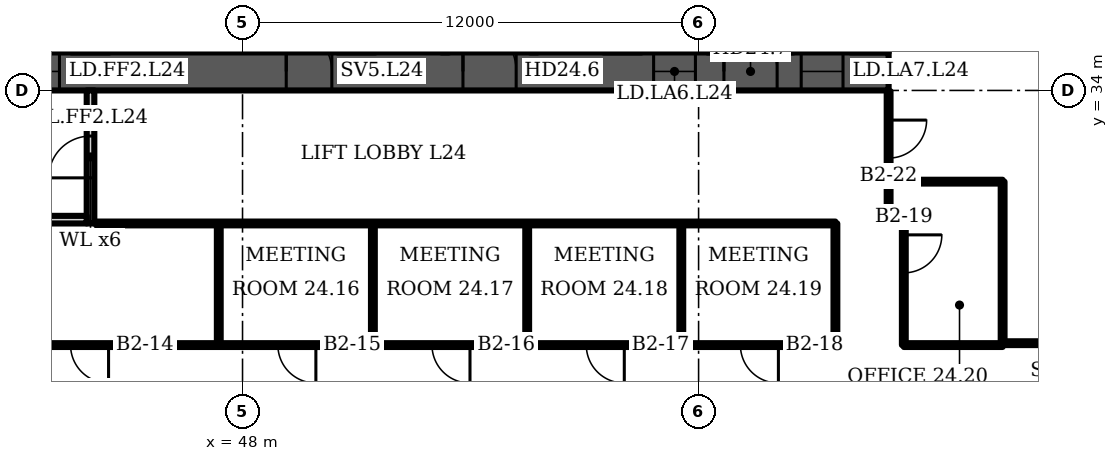
"""IFC4 building model, lengths in metres.
Left out: names, types, materials, properties, quantities, classifications, styles, units other than length and angle.
Written with IfcOpenShell. Run it as: python <this file> out.ifc"""

import sys

from ifc_helpers import new_model, si_unit, direction, frame, frame_2d, origin, place, context, subcontext, project, spatial, rectangle, extrude, element, fill, save


model = new_model("IFC4")
c1 = context("Model", 3, precision=1e-05, world=origin(), true_north=direction((0.0, 1.0)))
c2 = subcontext(c1, "Body", "Model", "MODEL_VIEW")
j1 = project(units=[si_unit("LENGTHUNIT", "METRE"), si_unit("PLANEANGLEUNIT", "RADIAN")], contexts=[c1])
p1 = place(None, origin())
s1 = spatial("IfcSite", under=j1, at=p1, CompositionType="ELEMENT")
p2 = place(p1, origin())
s2 = spatial("IfcBuilding", under=s1, at=p2, CompositionType="ELEMENT")
p3 = place(p2, frame((0.0, 0.0, 107.5)))
s3 = spatial("IfcBuildingStorey", under=s2, at=p3, CompositionType="ELEMENT", Elevation=107.5)
p4 = place(p3, frame((16.0, 34.5, 0.0), z_axis=(0.0, 0.0, 1.0), x_axis=(1.0, 0.0, 0.0)))
e1 = element("IfcWall", 1, at=p4, inside=s3, PredefinedType="SHEAR", context=c2, shape_type="SweptSolid", body=[
    extrude(rectangle(XDim=49.0, YDim=1.0, at=frame_2d((24.5, 0.0))), origin(), (0.0, 0.0, 1.0), 3.6),
])
p5 = place(p4, frame((1.2, 0.0, 0.0)))
e2 = element("IfcOpeningElement", 2, at=p5, cuts=e1, PredefinedType="OPENING", context=c2, shape_type="SweptSolid", body=[
    extrude(rectangle(XDim=1.1, YDim=2.1, at=frame_2d((0.55, 1.05))), frame((0.0, 0.51, 0.0), z_axis=(0.0, -1.0, 0.0), x_axis=(1.0, 0.0, 0.0)), (0.0, 0.0, 1.0), 1.02),
])
p6 = place(p4, frame((5.083, 0.0, 0.0)))
e3 = element("IfcOpeningElement", 3, at=p6, cuts=e1, PredefinedType="OPENING", context=c2, shape_type="SweptSolid", body=[
    extrude(rectangle(XDim=1.1, YDim=2.1, at=frame_2d((0.55, 1.05))), frame((0.0, 0.51, 0.0), z_axis=(0.0, -1.0, 0.0), x_axis=(1.0, 0.0, 0.0)), (0.0, 0.0, 1.0), 1.02),
])
p7 = place(p4, frame((2.933, 0.0, 0.0)))
e4 = element("IfcOpeningElement", 4, at=p7, cuts=e1, PredefinedType="OPENING", context=c2, shape_type="SweptSolid", body=[
    extrude(rectangle(XDim=1.4, YDim=2.1, at=frame_2d((0.7, 1.05))), frame((0.0, 0.51, 0.0), z_axis=(0.0, -1.0, 0.0), x_axis=(1.0, 0.0, 0.0)), (0.0, 0.0, 1.0), 1.02),
])
p8 = place(p4, frame((7.65, 0.0, 0.0)))
e5 = element("IfcOpeningElement", 5, at=p8, cuts=e1, PredefinedType="OPENING", context=c2, shape_type="SweptSolid", body=[
    extrude(rectangle(XDim=1.2, YDim=2.1, at=frame_2d((0.6, 1.05))), frame((0.0, 0.51, 0.0), z_axis=(0.0, -1.0, 0.0), x_axis=(1.0, 0.0, 0.0)), (0.0, 0.0, 1.0), 1.02),
])
p9 = place(p4, frame((14.817, 0.0, 0.0)))
e6 = element("IfcOpeningElement", 6, at=p9, cuts=e1, PredefinedType="OPENING", context=c2, shape_type="SweptSolid", body=[
    extrude(rectangle(XDim=1.1, YDim=2.1, at=frame_2d((0.55, 1.05))), frame((0.0, 0.51, 0.0), z_axis=(0.0, -1.0, 0.0), x_axis=(1.0, 0.0, 0.0)), (0.0, 0.0, 1.0), 1.02),
])
p10 = place(p4, frame((19.083, 0.0, 0.0)))
e7 = element("IfcOpeningElement", 7, at=p10, cuts=e1, PredefinedType="OPENING", context=c2, shape_type="SweptSolid", body=[
    extrude(rectangle(XDim=1.1, YDim=2.1, at=frame_2d((0.55, 1.05))), frame((0.0, 0.51, 0.0), z_axis=(0.0, -1.0, 0.0), x_axis=(1.0, 0.0, 0.0)), (0.0, 0.0, 1.0), 1.02),
])
p11 = place(p4, frame((16.8, 0.0, 0.0)))
e8 = element("IfcOpeningElement", 8, at=p11, cuts=e1, PredefinedType="OPENING", context=c2, shape_type="SweptSolid", body=[
    extrude(rectangle(XDim=1.4, YDim=2.1, at=frame_2d((0.7, 1.05))), frame((0.0, 0.51, 0.0), z_axis=(0.0, -1.0, 0.0), x_axis=(1.0, 0.0, 0.0)), (0.0, 0.0, 1.0), 1.02),
])
p12 = place(p4, frame((21.817, 0.0, 0.0)))
e9 = element("IfcOpeningElement", 9, at=p12, cuts=e1, PredefinedType="OPENING", context=c2, shape_type="SweptSolid", body=[
    extrude(rectangle(XDim=1.1, YDim=2.1, at=frame_2d((0.55, 1.05))), frame((0.0, 0.51, 0.0), z_axis=(0.0, -1.0, 0.0), x_axis=(1.0, 0.0, 0.0)), (0.0, 0.0, 1.0), 1.02),
])
p13 = place(p4, frame((26.083, 0.0, 0.0)))
e10 = element("IfcOpeningElement", 10, at=p13, cuts=e1, PredefinedType="OPENING", context=c2, shape_type="SweptSolid", body=[
    extrude(rectangle(XDim=1.1, YDim=2.1, at=frame_2d((0.55, 1.05))), frame((0.0, 0.51, 0.0), z_axis=(0.0, -1.0, 0.0), x_axis=(1.0, 0.0, 0.0)), (0.0, 0.0, 1.0), 1.02),
])
p14 = place(p4, frame((33.15, 0.0, 0.0)))
e11 = element("IfcOpeningElement", 11, at=p14, cuts=e1, PredefinedType="OPENING", context=c2, shape_type="SweptSolid", body=[
    extrude(rectangle(XDim=1.2, YDim=2.1, at=frame_2d((0.6, 1.05))), frame((0.0, 0.51, 0.0), z_axis=(0.0, -1.0, 0.0), x_axis=(1.0, 0.0, 0.0)), (0.0, 0.0, 1.0), 1.02),
])
p15 = place(p4, frame((37.8, 0.0, 0.0)))
e12 = element("IfcOpeningElement", 12, at=p15, cuts=e1, PredefinedType="OPENING", context=c2, shape_type="SweptSolid", body=[
    extrude(rectangle(XDim=1.4, YDim=2.1, at=frame_2d((0.7, 1.05))), frame((0.0, 0.51, 0.0), z_axis=(0.0, -1.0, 0.0), x_axis=(1.0, 0.0, 0.0)), (0.0, 0.0, 1.0), 1.02),
])
p16 = place(p4, frame((42.817, 0.0, 0.0)))
e13 = element("IfcOpeningElement", 13, at=p16, cuts=e1, PredefinedType="OPENING", context=c2, shape_type="SweptSolid", body=[
    extrude(rectangle(XDim=1.1, YDim=2.1, at=frame_2d((0.55, 1.05))), frame((0.0, 0.51, 0.0), z_axis=(0.0, -1.0, 0.0), x_axis=(1.0, 0.0, 0.0)), (0.0, 0.0, 1.0), 1.02),
])
p17 = place(p4, frame((46.7, 0.0, 0.0)))
e14 = element("IfcOpeningElement", 14, at=p17, cuts=e1, PredefinedType="OPENING", context=c2, shape_type="SweptSolid", body=[
    extrude(rectangle(XDim=1.1, YDim=2.1, at=frame_2d((0.55, 1.05))), frame((0.0, 0.51, 0.0), z_axis=(0.0, -1.0, 0.0), x_axis=(1.0, 0.0, 0.0)), (0.0, 0.0, 1.0), 1.02),
])
p18 = place(p4, frame((44.667, 0.0, 0.0)))
e15 = element("IfcOpeningElement", 15, at=p18, cuts=e1, PredefinedType="OPENING", context=c2, shape_type="SweptSolid", body=[
    extrude(rectangle(XDim=1.4, YDim=2.1, at=frame_2d((0.7, 1.05))), frame((0.0, 0.51, 0.0), z_axis=(0.0, -1.0, 0.0), x_axis=(1.0, 0.0, 0.0)), (0.0, 0.0, 1.0), 1.02),
])
p19 = place(p3, frame((44.0, 30.5, 0.0), z_axis=(0.0, 0.0, 1.0), x_axis=(0.0, 1.0, 0.0)))
e16 = element("IfcWall", 16, at=p19, inside=s3, PredefinedType="PARTITIONING", context=c2, shape_type="SweptSolid", body=[
    extrude(rectangle(XDim=3.5, YDim=0.2, at=frame_2d((1.75, 0.0))), origin(), (0.0, 0.0, 1.0), 3.2),
])
p20 = place(p19, frame((1.2, 0.0, 0.0)))
e17 = element("IfcOpeningElement", 17, at=p20, cuts=e16, PredefinedType="OPENING", context=c2, shape_type="SweptSolid", body=[
    extrude(rectangle(XDim=1.1, YDim=2.1, at=frame_2d((0.55, 1.05))), frame((0.0, 0.11, 0.0), z_axis=(0.0, -1.0, 0.0), x_axis=(1.0, 0.0, 0.0)), (0.0, 0.0, 1.0), 0.22),
])
p21 = place(p3, frame((41.1, 30.6, 0.0), z_axis=(0.0, 0.0, 1.0), x_axis=(1.0, 0.0, 0.0)))
e18 = element("IfcWall", 18, at=p21, inside=s3, PredefinedType="PARTITIONING", context=c2, shape_type="SweptSolid", body=[
    extrude(rectangle(XDim=2.8, YDim=0.2, at=frame_2d((1.4, 0.0))), origin(), (0.0, 0.0, 1.0), 3.2),
])
p22 = place(p3, frame((21.2, 27.3, 0.0), z_axis=(0.0, 0.0, 1.0), x_axis=(1.0, 0.0, 0.0)))
e19 = element("IfcWall", 19, at=p22, inside=s3, PredefinedType="PARTITIONING", context=c2, shape_type="SweptSolid", body=[
    extrude(rectangle(XDim=42.4, YDim=0.1, at=frame_2d((21.2, 0.0))), origin(), (0.0, 0.0, 1.0), 3.2),
])
p23 = place(p22, frame((22.275, 0.0, 0.0)))
e20 = element("IfcOpeningElement", 20, at=p23, cuts=e19, PredefinedType="OPENING", context=c2, shape_type="SweptSolid", body=[
    extrude(rectangle(XDim=1.0, YDim=2.1, at=frame_2d((0.5, 1.05))), frame((0.0, 0.06, 0.0), z_axis=(0.0, -1.0, 0.0), x_axis=(1.0, 0.0, 0.0)), (0.0, 0.0, 1.0), 0.12),
])
p24 = place(p22, frame((27.73, 0.0, 0.0)))
e21 = element("IfcOpeningElement", 21, at=p24, cuts=e19, PredefinedType="OPENING", context=c2, shape_type="SweptSolid", body=[
    extrude(rectangle(XDim=1.0, YDim=2.1, at=frame_2d((0.5, 1.05))), frame((0.0, 0.06, 0.0), z_axis=(0.0, -1.0, 0.0), x_axis=(1.0, 0.0, 0.0)), (0.0, 0.0, 1.0), 0.12),
])
p25 = place(p22, frame((31.785, 0.0, 0.0)))
e22 = element("IfcOpeningElement", 22, at=p25, cuts=e19, PredefinedType="OPENING", context=c2, shape_type="SweptSolid", body=[
    extrude(rectangle(XDim=1.0, YDim=2.1, at=frame_2d((0.5, 1.05))), frame((0.0, 0.06, 0.0), z_axis=(0.0, -1.0, 0.0), x_axis=(1.0, 0.0, 0.0)), (0.0, 0.0, 1.0), 0.12),
])
p26 = place(p22, frame((35.845, 0.0, 0.0)))
e23 = element("IfcOpeningElement", 23, at=p26, cuts=e19, PredefinedType="OPENING", context=c2, shape_type="SweptSolid", body=[
    extrude(rectangle(XDim=1.0, YDim=2.1, at=frame_2d((0.5, 1.05))), frame((0.0, 0.06, 0.0), z_axis=(0.0, -1.0, 0.0), x_axis=(1.0, 0.0, 0.0)), (0.0, 0.0, 1.0), 0.12),
])
p27 = place(p22, frame((39.9, 0.0, 0.0)))
e24 = element("IfcOpeningElement", 24, at=p27, cuts=e19, PredefinedType="OPENING", context=c2, shape_type="SweptSolid", body=[
    extrude(rectangle(XDim=1.0, YDim=2.1, at=frame_2d((0.5, 1.05))), frame((0.0, 0.06, 0.0), z_axis=(0.0, -1.0, 0.0), x_axis=(1.0, 0.0, 0.0)), (0.0, 0.0, 1.0), 0.12),
])
for number, where, z_axis, x_axis in (
    (25, (47.375, 27.3, 0.0), (0.0, 0.0, 1.0), (0.0, 1.0, 0.0)),
    (26, (51.43, 27.3, 0.0), (0.0, 0.0, 1.0), (0.0, 1.0, 0.0)),
    (27, (55.49, 27.3, 0.0), (0.0, 0.0, 1.0), (0.0, 1.0, 0.0)),
    (28, (59.545, 27.3, 0.0), (0.0, 0.0, 1.0), (0.0, 1.0, 0.0)),
    (29, (63.6, 27.3, 0.0), (0.0, 0.0, 1.0), (0.0, 1.0, 0.0)),
):
    element("IfcWall", number, at=place(p3, frame(where, z_axis=z_axis, x_axis=x_axis)), inside=s3, PredefinedType="PARTITIONING", context=c2, shape_type="SweptSolid", body=[
        extrude(rectangle(XDim=3.2, YDim=0.1, at=frame_2d((1.6, 0.0))), origin(), (0.0, 0.0, 1.0), 3.2),
    ])
p28 = place(p3, frame((65.0, 30.56, 0.0), z_axis=(0.0, 0.0, 1.0), x_axis=(0.0, 1.0, 0.0)))
e30 = element("IfcWall", 30, at=p28, inside=s3, PredefinedType="PARTITIONING", context=c2, shape_type="SweptSolid", body=[
    extrude(rectangle(XDim=3.42, YDim=0.1, at=frame_2d((1.71, 0.0))), origin(), (0.0, 0.0, 1.0), 3.2),
])
p29 = place(p28, frame((1.66, 0.0, 0.0)))
e31 = element("IfcOpeningElement", 31, at=p29, cuts=e30, PredefinedType="OPENING", context=c2, shape_type="SweptSolid", body=[
    extrude(rectangle(XDim=1.0, YDim=2.1, at=frame_2d((0.5, 1.05))), frame((0.0, 0.06, 0.0), z_axis=(0.0, -1.0, 0.0), x_axis=(1.0, 0.0, 0.0)), (0.0, 0.0, 1.0), 0.12),
])
p30 = place(p3, frame((65.0, 31.6, 0.0), z_axis=(0.0, 0.0, 1.0), x_axis=(1.0, 0.0, 0.0)))
e32 = element("IfcWall", 32, at=p30, inside=s3, PredefinedType="PARTITIONING", context=c2, shape_type="SweptSolid", body=[
    extrude(rectangle(XDim=3.0, YDim=0.1, at=frame_2d((1.5, 0.0))), origin(), (0.0, 0.0, 1.0), 3.2),
])
p31 = place(p3, frame((65.395, 30.5, 0.0), z_axis=(0.0, 0.0, 1.0), x_axis=(-0.988637, 0.150312, 0.0)))
e33 = element("IfcWall", 33, at=p31, inside=s3, PredefinedType="PARTITIONING", context=c2, shape_type="SweptSolid", body=[
    extrude(rectangle(XDim=0.4, YDim=0.1, at=frame_2d((0.2, 0.0))), origin(), (0.0, 0.0, 1.0), 3.2),
])
p32 = place(p3, frame((65.4, 27.3, 0.0), z_axis=(0.0, 0.0, 1.0), x_axis=(0.0, 1.0, 0.0)))
e34 = element("IfcWall", 34, at=p32, inside=s3, PredefinedType="PARTITIONING", context=c2, shape_type="SweptSolid", body=[
    extrude(rectangle(XDim=3.2, YDim=0.1, at=frame_2d((1.6, 0.0))), origin(), (0.0, 0.0, 1.0), 3.2),
])
p33 = place(p32, frame((1.9, 0.0, 0.0)))
e35 = element("IfcOpeningElement", 35, at=p33, cuts=e34, PredefinedType="OPENING", context=c2, shape_type="SweptSolid", body=[
    extrude(rectangle(XDim=1.0, YDim=2.1, at=frame_2d((0.5, 1.05))), frame((0.0, 0.06, 0.0), z_axis=(0.0, -1.0, 0.0), x_axis=(1.0, 0.0, 0.0)), (0.0, 0.0, 1.0), 0.12),
])
p34 = place(p3, frame((65.4, 27.3, 0.0), z_axis=(0.0, 0.0, 1.0), x_axis=(1.0, 0.0, 0.0)))
e36 = element("IfcWall", 36, at=p34, inside=s3, PredefinedType="PARTITIONING", context=c2, shape_type="SweptSolid", body=[
    extrude(rectangle(XDim=2.6, YDim=0.1, at=frame_2d((1.3, 0.0))), origin(), (0.0, 0.0, 1.0), 3.2),
])
p35 = place(p3, frame((68.0, 27.3, 0.0), z_axis=(0.0, 0.0, 1.0), x_axis=(0.0, 1.0, 0.0)))
e37 = element("IfcWall", 37, at=p35, inside=s3, PredefinedType="PARTITIONING", context=c2, shape_type="SweptSolid", body=[
    extrude(rectangle(XDim=4.3, YDim=0.1, at=frame_2d((2.15, 0.0))), origin(), (0.0, 0.0, 1.0), 3.2),
])
p36 = place(p3, frame((68.05, 27.35, 0.0), z_axis=(0.0, 0.0, 1.0), x_axis=(1.0, 0.0, 0.0)))
e38 = element("IfcWall", 38, at=p36, inside=s3, PredefinedType="PARTITIONING", context=c2, shape_type="SweptSolid", body=[
    extrude(rectangle(XDim=1.62, YDim=0.1, at=frame_2d((0.81, 0.0))), origin(), (0.0, 0.0, 1.0), 3.2),
])
p37 = place(p3, frame((44.15, 30.5, 0.0), z_axis=(0.0, 0.0, 1.0), x_axis=(1.0, 0.0, 0.0)))
e39 = element("IfcWall", 39, at=p37, inside=s3, PredefinedType="PARTITIONING", context=c2, shape_type="SweptSolid", body=[
    extrude(rectangle(XDim=19.45, YDim=0.1, at=frame_2d((9.725, 0.0))), origin(), (0.0, 0.0, 1.0), 3.2),
])
p38 = place(p13, origin())
e40 = element("IfcDoor", 40, at=p38, inside=s3, OperationType="DOUBLE_DOOR_SLIDING", PredefinedType="DOOR", context=c2, shape_type="SweptSolid", body=[
    extrude(rectangle(XDim=1.1, YDim=2.1, at=frame_2d((0.55, 1.05))), frame((0.0, 0.025, 0.0), z_axis=(0.0, -1.0, 0.0), x_axis=(1.0, 0.0, 0.0)), (0.0, 0.0, 1.0), 0.05),
])
fill(e10, e40)
p39 = place(p14, origin())
e41 = element("IfcDoor", 41, at=p39, inside=s3, OperationType="SINGLE_SWING_LEFT", PredefinedType="DOOR", context=c2, shape_type="SweptSolid", body=[
    extrude(rectangle(XDim=1.2, YDim=2.1, at=frame_2d((0.6, 1.05))), frame((0.0, 0.025, 0.0), z_axis=(0.0, -1.0, 0.0), x_axis=(1.0, 0.0, 0.0)), (0.0, 0.0, 1.0), 0.05),
])
fill(e11, e41)
p40 = place(p15, origin())
e42 = element("IfcDoor", 42, at=p40, inside=s3, OperationType="DOUBLE_DOOR_SINGLE_SWING", PredefinedType="DOOR", context=c2, shape_type="SweptSolid", body=[
    extrude(rectangle(XDim=1.4, YDim=2.1, at=frame_2d((0.7, 1.05))), frame((0.0, 0.025, 0.0), z_axis=(0.0, -1.0, 0.0), x_axis=(1.0, 0.0, 0.0)), (0.0, 0.0, 1.0), 0.05),
])
fill(e12, e42)
p41 = place(p16, origin())
e43 = element("IfcDoor", 43, at=p41, inside=s3, OperationType="DOUBLE_DOOR_SLIDING", PredefinedType="DOOR", context=c2, shape_type="SweptSolid", body=[
    extrude(rectangle(XDim=1.1, YDim=2.1, at=frame_2d((0.55, 1.05))), frame((0.0, 0.025, 0.0), z_axis=(0.0, -1.0, 0.0), x_axis=(1.0, 0.0, 0.0)), (0.0, 0.0, 1.0), 0.05),
])
fill(e13, e43)
p42 = place(p17, origin())
e44 = element("IfcDoor", 44, at=p42, inside=s3, OperationType="DOUBLE_DOOR_SLIDING", PredefinedType="DOOR", context=c2, shape_type="SweptSolid", body=[
    extrude(rectangle(XDim=1.1, YDim=2.1, at=frame_2d((0.55, 1.05))), frame((0.0, 0.025, 0.0), z_axis=(0.0, -1.0, 0.0), x_axis=(1.0, 0.0, 0.0)), (0.0, 0.0, 1.0), 0.05),
])
fill(e14, e44)
p43 = place(p18, origin())
e45 = element("IfcDoor", 45, at=p43, inside=s3, OperationType="DOUBLE_DOOR_SINGLE_SWING", PredefinedType="DOOR", context=c2, shape_type="SweptSolid", body=[
    extrude(rectangle(XDim=1.4, YDim=2.1, at=frame_2d((0.7, 1.05))), frame((0.0, 0.025, 0.0), z_axis=(0.0, -1.0, 0.0), x_axis=(1.0, 0.0, 0.0)), (0.0, 0.0, 1.0), 0.05),
])
fill(e15, e45)
p44 = place(p20, origin())
e46 = element("IfcDoor", 46, at=p44, inside=s3, OperationType="SINGLE_SWING_LEFT", PredefinedType="DOOR", context=c2, shape_type="SweptSolid", body=[
    extrude(rectangle(XDim=1.1, YDim=2.1, at=frame_2d((0.55, 1.05))), frame((0.0, 0.025, 0.0), z_axis=(0.0, -1.0, 0.0), x_axis=(1.0, 0.0, 0.0)), (0.0, 0.0, 1.0), 0.05),
])
fill(e17, e46)
p45 = place(p23, origin())
e47 = element("IfcDoor", 47, at=p45, inside=s3, OperationType="SINGLE_SWING_RIGHT", PredefinedType="DOOR", context=c2, shape_type="SweptSolid", body=[
    extrude(rectangle(XDim=1.0, YDim=2.1, at=frame_2d((0.5, 1.05))), frame((0.0, 0.025, 0.0), z_axis=(0.0, -1.0, 0.0), x_axis=(1.0, 0.0, 0.0)), (0.0, 0.0, 1.0), 0.05),
])
fill(e20, e47)
p46 = place(p24, origin())
e48 = element("IfcDoor", 48, at=p46, inside=s3, OperationType="SINGLE_SWING_RIGHT", PredefinedType="DOOR", context=c2, shape_type="SweptSolid", body=[
    extrude(rectangle(XDim=1.0, YDim=2.1, at=frame_2d((0.5, 1.05))), frame((0.0, 0.025, 0.0), z_axis=(0.0, -1.0, 0.0), x_axis=(1.0, 0.0, 0.0)), (0.0, 0.0, 1.0), 0.05),
])
fill(e21, e48)
p47 = place(p25, origin())
e49 = element("IfcDoor", 49, at=p47, inside=s3, OperationType="SINGLE_SWING_RIGHT", PredefinedType="DOOR", context=c2, shape_type="SweptSolid", body=[
    extrude(rectangle(XDim=1.0, YDim=2.1, at=frame_2d((0.5, 1.05))), frame((0.0, 0.025, 0.0), z_axis=(0.0, -1.0, 0.0), x_axis=(1.0, 0.0, 0.0)), (0.0, 0.0, 1.0), 0.05),
])
fill(e22, e49)
p48 = place(p26, origin())
e50 = element("IfcDoor", 50, at=p48, inside=s3, OperationType="SINGLE_SWING_RIGHT", PredefinedType="DOOR", context=c2, shape_type="SweptSolid", body=[
    extrude(rectangle(XDim=1.0, YDim=2.1, at=frame_2d((0.5, 1.05))), frame((0.0, 0.025, 0.0), z_axis=(0.0, -1.0, 0.0), x_axis=(1.0, 0.0, 0.0)), (0.0, 0.0, 1.0), 0.05),
])
fill(e23, e50)
p49 = place(p27, origin())
e51 = element("IfcDoor", 51, at=p49, inside=s3, OperationType="SINGLE_SWING_RIGHT", PredefinedType="DOOR", context=c2, shape_type="SweptSolid", body=[
    extrude(rectangle(XDim=1.0, YDim=2.1, at=frame_2d((0.5, 1.05))), frame((0.0, 0.025, 0.0), z_axis=(0.0, -1.0, 0.0), x_axis=(1.0, 0.0, 0.0)), (0.0, 0.0, 1.0), 0.05),
])
fill(e24, e51)
p50 = place(p33, origin())
e52 = element("IfcDoor", 52, at=p50, inside=s3, OperationType="SINGLE_SWING_RIGHT", PredefinedType="DOOR", context=c2, shape_type="SweptSolid", body=[
    extrude(rectangle(XDim=1.0, YDim=2.1, at=frame_2d((0.5, 1.05))), frame((0.0, 0.025, 0.0), z_axis=(0.0, -1.0, 0.0), x_axis=(1.0, 0.0, 0.0)), (0.0, 0.0, 1.0), 0.05),
])
fill(e35, e52)
p51 = place(p29, origin())
e53 = element("IfcDoor", 53, at=p51, inside=s3, OperationType="SINGLE_SWING_RIGHT", PredefinedType="DOOR", context=c2, shape_type="SweptSolid", body=[
    extrude(rectangle(XDim=1.0, YDim=2.1, at=frame_2d((0.5, 1.05))), frame((0.0, 0.025, 0.0), z_axis=(0.0, -1.0, 0.0), x_axis=(1.0, 0.0, 0.0)), (0.0, 0.0, 1.0), 0.05),
])
fill(e31, e53)
save(model, sys.argv[1])
